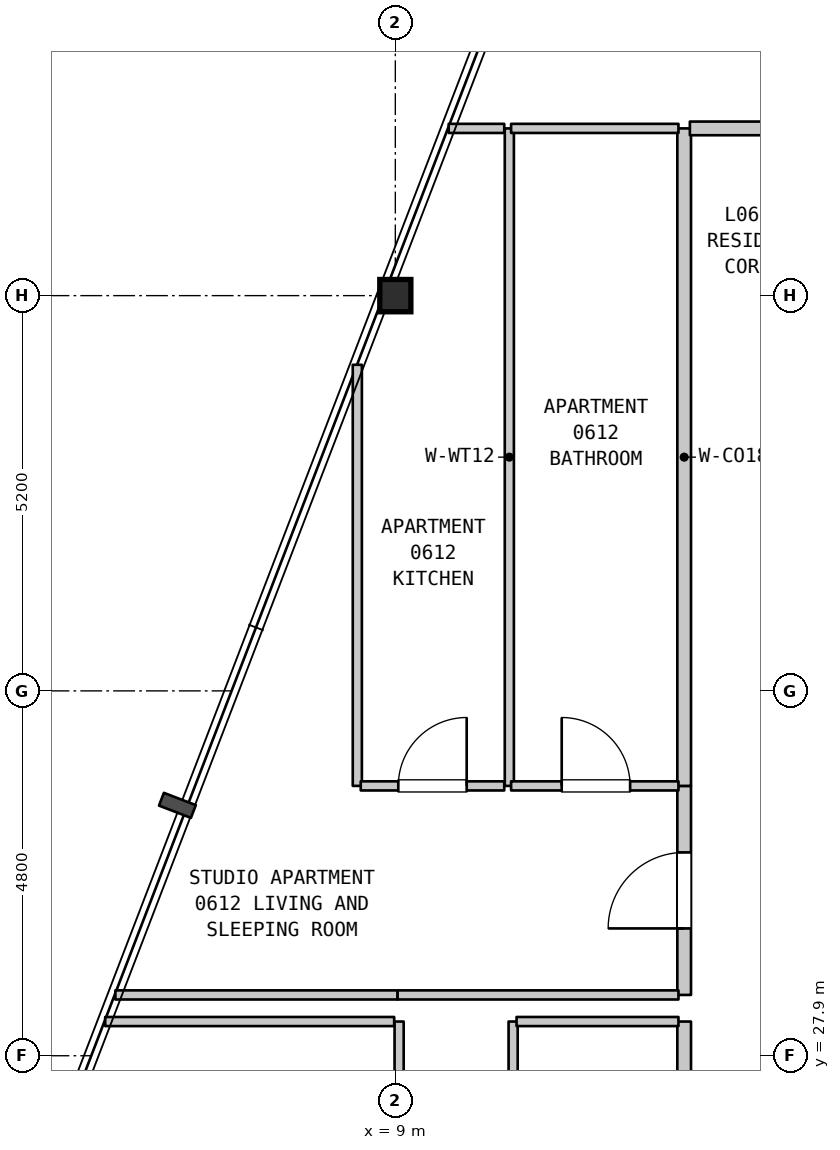
"""IFC4 building model, lengths in metres.
Left out: names, types, materials, properties, quantities, classifications, styles, units other than length and angle.
Written with IfcOpenShell. Run it as: python <this file> out.ifc"""

import sys

from ifc_helpers import new_model, si_unit, direction, frame, frame_2d, origin, origin_2d, place, context, subcontext, project, spatial, rectangle, i_section, extrude, element, fill, save


model = new_model("IFC4")
c1 = context("Model", 3, precision=1e-05, world=origin(), true_north=direction((0.0, 1.0)))
c2 = subcontext(c1, "Body", "Model", "MODEL_VIEW")
j1 = project(units=[si_unit("LENGTHUNIT", "METRE"), si_unit("PLANEANGLEUNIT", "RADIAN")], contexts=[c1])
p1 = place(None, origin())
s1 = spatial("IfcSite", under=j1, at=p1, CompositionType="ELEMENT")
p2 = place(p1, origin())
s2 = spatial("IfcBuilding", under=s1, at=p2, CompositionType="ELEMENT")
p3 = place(p2, frame((0.0, 0.0, 31.4)))
s3 = spatial("IfcBuildingStorey", under=s2, at=p3, CompositionType="ELEMENT", Elevation=31.4)
p4 = place(p3, frame((9.0, 37.9, 0.0), z_axis=(0.0, 0.0, 1.0), x_axis=(1.0, 0.0, 0.0)))
e1 = element("IfcColumn", 1, at=p4, inside=s3, PredefinedType="COLUMN", context=c2, shape_type="SweptSolid", body=[
    extrude(i_section(OverallWidth=0.409, OverallDepth=0.425, WebThickness=0.032, FlangeThickness=0.052, FilletRadius=0.015, at=origin_2d()), origin(), (0.0, 0.0, 1.0), 3.7),
])
p5 = place(p3, frame((8.5, 31.45, 0.0), z_axis=(0.0, 0.0, 1.0), x_axis=(0.0, 1.0, 0.0)))
e2 = element("IfcWall", 2, at=p5, inside=s3, PredefinedType="PARTITIONING", context=c2, shape_type="SweptSolid", body=[
    extrude(rectangle(XDim=5.54, YDim=0.12, at=frame_2d((2.77, 0.0))), origin(), (0.0, 0.0, 1.0), 3.385),
])
p6 = place(p3, frame((9.05, 20.4, 0.0), z_axis=(0.0, 0.0, 1.0), x_axis=(0.0, 1.0, 0.0)))
e3 = element("IfcWall", 3, at=p6, inside=s3, PredefinedType="PARTITIONING", context=c2, shape_type="SweptSolid", body=[
    extrude(rectangle(XDim=7.95, YDim=0.12, at=frame_2d((3.975, 0.0))), origin(), (0.0, 0.0, 1.0), 2.785),
])
p7 = place(p6, frame((1.05, 0.0, 0.0)))
e4 = element("IfcOpeningElement", 4, at=p7, cuts=e3, PredefinedType="OPENING", context=c2, shape_type="SweptSolid", body=[
    extrude(rectangle(XDim=0.9, YDim=2.15, at=frame_2d((0.45, 1.075))), frame((0.0, 0.07, 0.0), z_axis=(0.0, -1.0, 0.0), x_axis=(1.0, 0.0, 0.0)), (0.0, 0.0, 1.0), 0.14),
])
p8 = place(p6, frame((3.455, 0.0, 0.0)))
e5 = element("IfcOpeningElement", 5, at=p8, cuts=e3, PredefinedType="OPENING", context=c2, shape_type="SweptSolid", body=[
    extrude(rectangle(XDim=0.9, YDim=2.15, at=frame_2d((0.45, 1.075))), frame((0.0, 0.07, 0.0), z_axis=(0.0, -1.0, 0.0), x_axis=(1.0, 0.0, 0.0)), (0.0, 0.0, 1.0), 0.14),
])
p9 = place(p6, frame((6.0, 0.0, 0.0)))
e6 = element("IfcOpeningElement", 6, at=p9, cuts=e3, PredefinedType="OPENING", context=c2, shape_type="SweptSolid", body=[
    extrude(rectangle(XDim=0.9, YDim=2.15, at=frame_2d((0.45, 1.075))), frame((0.0, 0.07, 0.0), z_axis=(0.0, -1.0, 0.0), x_axis=(1.0, 0.0, 0.0)), (0.0, 0.0, 1.0), 0.14),
])
p10 = place(p3, frame((10.5, 31.45, 0.0), z_axis=(0.0, 0.0, 1.0), x_axis=(0.0, 1.0, 0.0)))
e7 = element("IfcWall", 7, at=p10, inside=s3, PredefinedType="PARTITIONING", context=c2, shape_type="SweptSolid", body=[
    extrude(rectangle(XDim=8.65, YDim=0.12, at=frame_2d((4.325, 0.0))), origin(), (0.0, 0.0, 1.0), 3.385),
])
p11 = place(p3, frame((10.55, 25.647, 0.0), z_axis=(0.0, 0.0, 1.0), x_axis=(0.0, 1.0, 0.0)))
e8 = element("IfcWall", 8, at=p11, inside=s3, PredefinedType="PARTITIONING", context=c2, shape_type="SweptSolid", body=[
    extrude(rectangle(XDim=2.703, YDim=0.12, at=frame_2d((1.352, 0.0))), origin(), (0.0, 0.0, 1.0), 3.385),
])
p12 = place(p11, frame((0.83, 0.0, 0.0)))
e9 = element("IfcOpeningElement", 9, at=p12, cuts=e8, PredefinedType="OPENING", context=c2, shape_type="SweptSolid", body=[
    extrude(rectangle(XDim=0.9, YDim=2.15, at=frame_2d((0.45, 1.075))), frame((0.0, 0.07, 0.0), z_axis=(0.0, -1.0, 0.0), x_axis=(1.0, 0.0, 0.0)), (0.0, 0.0, 1.0), 0.14),
])
p13 = place(p3, frame((12.8, 25.647, 0.0), z_axis=(0.0, 0.0, 1.0), x_axis=(0.0, 1.0, 0.0)))
e10 = element("IfcWall", 10, at=p13, inside=s3, PredefinedType="STANDARD", context=c2, shape_type="SweptSolid", body=[
    extrude(rectangle(XDim=2.703, YDim=0.18, at=frame_2d((1.352, 0.0))), origin(), (0.0, 0.0, 1.0), 3.385),
])
p14 = place(p3, frame((12.8, 28.7, 0.0), z_axis=(0.0, 0.0, 1.0), x_axis=(0.0, 1.0, 0.0)))
e11 = element("IfcWall", 11, at=p14, inside=s3, PredefinedType="STANDARD", context=c2, shape_type="SweptSolid", body=[
    extrude(rectangle(XDim=2.75, YDim=0.18, at=frame_2d((1.375, 0.0))), origin(), (0.0, 0.0, 1.0), 3.385),
])
p15 = place(p14, frame((0.875, 0.0, 0.0)))
e12 = element("IfcOpeningElement", 12, at=p15, cuts=e11, PredefinedType="OPENING", context=c2, shape_type="SweptSolid", body=[
    extrude(rectangle(XDim=1.0, YDim=2.15, at=frame_2d((0.5, 1.075))), frame((0.0, 0.1, 0.0), z_axis=(0.0, -1.0, 0.0), x_axis=(1.0, 0.0, 0.0)), (0.0, 0.0, 1.0), 0.2),
])
p16 = place(p3, frame((12.8, 31.45, 0.0), z_axis=(0.0, 0.0, 1.0), x_axis=(0.0, 1.0, 0.0)))
e13 = element("IfcWall", 13, at=p16, inside=s3, PredefinedType="STANDARD", context=c2, shape_type="SweptSolid", body=[
    extrude(rectangle(XDim=8.65, YDim=0.18, at=frame_2d((4.325, 0.0))), origin(), (0.0, 0.0, 1.0), 3.385),
])
p17 = place(p3, frame((5.183, 28.35, 0.0), z_axis=(0.0, 0.0, 1.0), x_axis=(1.0, 0.0, 0.0)))
e14 = element("IfcWall", 14, at=p17, inside=s3, PredefinedType="PARTITIONING", context=c2, shape_type="SweptSolid", body=[
    extrude(rectangle(XDim=3.802, YDim=0.12, at=frame_2d((1.901, 0.0))), origin(), (0.0, 0.0, 1.0), 3.385),
])
p18 = place(p3, frame((10.595, 28.35, 0.0), z_axis=(0.0, 0.0, 1.0), x_axis=(1.0, 0.0, 0.0)))
e15 = element("IfcWall", 15, at=p18, inside=s3, PredefinedType="PARTITIONING", context=c2, shape_type="SweptSolid", body=[
    extrude(rectangle(XDim=2.13, YDim=0.12, at=frame_2d((1.065, 0.0))), origin(), (0.0, 0.0, 1.0), 3.385),
])
p19 = place(p3, frame((5.317, 28.7, 0.0), z_axis=(0.0, 0.0, 1.0), x_axis=(1.0, 0.0, 0.0)))
e16 = element("IfcWall", 16, at=p19, inside=s3, PredefinedType="PARTITIONING", context=c2, shape_type="SweptSolid", body=[
    extrude(rectangle(XDim=3.713, YDim=0.12, at=frame_2d((1.856, 0.0))), origin(), (0.0, 0.0, 1.0), 3.385),
])
p20 = place(p3, frame((9.03, 28.7, 0.0), z_axis=(0.0, 0.0, 1.0), x_axis=(1.0, 0.0, 0.0)))
e17 = element("IfcWall", 17, at=p20, inside=s3, PredefinedType="PARTITIONING", context=c2, shape_type="SweptSolid", body=[
    extrude(rectangle(XDim=3.695, YDim=0.12, at=frame_2d((1.848, 0.0))), origin(), (0.0, 0.0, 1.0), 3.385),
])
p21 = place(p3, frame((8.545, 31.45, 0.0), z_axis=(0.0, 0.0, 1.0), x_axis=(1.0, 0.0, 0.0)))
e18 = element("IfcWall", 18, at=p21, inside=s3, PredefinedType="PARTITIONING", context=c2, shape_type="SweptSolid", body=[
    extrude(rectangle(XDim=1.888, YDim=0.12, at=frame_2d((0.944, 0.0))), origin(), (0.0, 0.0, 1.0), 3.385),
])
p22 = place(p21, frame((0.494, 0.0, 0.0)))
e19 = element("IfcOpeningElement", 19, at=p22, cuts=e18, PredefinedType="OPENING", context=c2, shape_type="SweptSolid", body=[
    extrude(rectangle(XDim=0.9, YDim=2.15, at=frame_2d((0.45, 1.075))), frame((0.0, 0.07, 0.0), z_axis=(0.0, -1.0, 0.0), x_axis=(1.0, 0.0, 0.0)), (0.0, 0.0, 1.0), 0.14),
])
p23 = place(p3, frame((10.523, 31.45, 0.0), z_axis=(0.0, 0.0, 1.0), x_axis=(1.0, 0.0, 0.0)))
e20 = element("IfcWall", 20, at=p23, inside=s3, PredefinedType="PARTITIONING", context=c2, shape_type="SweptSolid", body=[
    extrude(rectangle(XDim=2.202, YDim=0.12, at=frame_2d((1.101, 0.0))), origin(), (0.0, 0.0, 1.0), 3.385),
])
p24 = place(p23, frame((0.666, 0.0, 0.0)))
e21 = element("IfcOpeningElement", 21, at=p24, cuts=e20, PredefinedType="OPENING", context=c2, shape_type="SweptSolid", body=[
    extrude(rectangle(XDim=0.9, YDim=2.1, at=frame_2d((0.45, 1.05))), frame((0.0, 0.07, 0.0), z_axis=(0.0, -1.0, 0.0), x_axis=(1.0, 0.0, 0.0)), (0.0, 0.0, 1.0), 0.14),
])
p25 = place(p3, frame((9.702, 40.1, 0.0), z_axis=(0.0, 0.0, 1.0), x_axis=(1.0, 0.0, 0.0)))
e22 = element("IfcWall", 22, at=p25, inside=s3, PredefinedType="PARTITIONING", context=c2, shape_type="SweptSolid", body=[
    extrude(rectangle(XDim=0.731, YDim=0.12, at=frame_2d((0.366, 0.0))), origin(), (0.0, 0.0, 1.0), 3.385),
])
p26 = place(p3, frame((10.523, 40.1, 0.0), z_axis=(0.0, 0.0, 1.0), x_axis=(1.0, 0.0, 0.0)))
e23 = element("IfcWall", 23, at=p26, inside=s3, PredefinedType="PARTITIONING", context=c2, shape_type="SweptSolid", body=[
    extrude(rectangle(XDim=2.202, YDim=0.12, at=frame_2d((1.101, 0.0))), origin(), (0.0, 0.0, 1.0), 3.385),
])
p27 = place(p3, frame((12.875, 40.1, 0.0), z_axis=(0.0, 0.0, 1.0), x_axis=(1.0, 0.0, 0.0)))
e24 = element("IfcWall", 24, at=p27, inside=s3, PredefinedType="STANDARD", context=c2, shape_type="SweptSolid", body=[
    extrude(rectangle(XDim=1.83, YDim=0.18, at=frame_2d((0.915, 0.0))), origin(), (0.0, 0.0, 1.0), 3.385),
])
p28 = place(p15, origin())
e25 = element("IfcDoor", 25, at=p28, inside=s3, OperationType="SINGLE_SWING_LEFT", PredefinedType="DOOR", context=c2, shape_type="SweptSolid", body=[
    extrude(rectangle(XDim=1.0, YDim=2.15, at=frame_2d((0.5, 1.075))), frame((0.0, 0.025, 0.0), z_axis=(0.0, -1.0, 0.0), x_axis=(1.0, 0.0, 0.0)), (0.0, 0.0, 1.0), 0.05),
])
fill(e12, e25)
p29 = place(p22, origin())
e26 = element("IfcDoor", 26, at=p29, inside=s3, OperationType="SINGLE_SWING_RIGHT", PredefinedType="DOOR", context=c2, shape_type="SweptSolid", body=[
    extrude(rectangle(XDim=0.9, YDim=2.15, at=frame_2d((0.45, 1.075))), frame((0.0, 0.025, 0.0), z_axis=(0.0, -1.0, 0.0), x_axis=(1.0, 0.0, 0.0)), (0.0, 0.0, 1.0), 0.05),
])
fill(e19, e26)
p30 = place(p24, origin())
e27 = element("IfcDoor", 27, at=p30, inside=s3, OperationType="SINGLE_SWING_LEFT", PredefinedType="DOOR", context=c2, shape_type="SweptSolid", body=[
    extrude(rectangle(XDim=0.9, YDim=2.1, at=frame_2d((0.45, 1.05))), frame((0.0, 0.025, 0.0), z_axis=(0.0, -1.0, 0.0), x_axis=(1.0, 0.0, 0.0)), (0.0, 0.0, 1.0), 0.05),
])
fill(e21, e27)
save(model, sys.argv[1])
